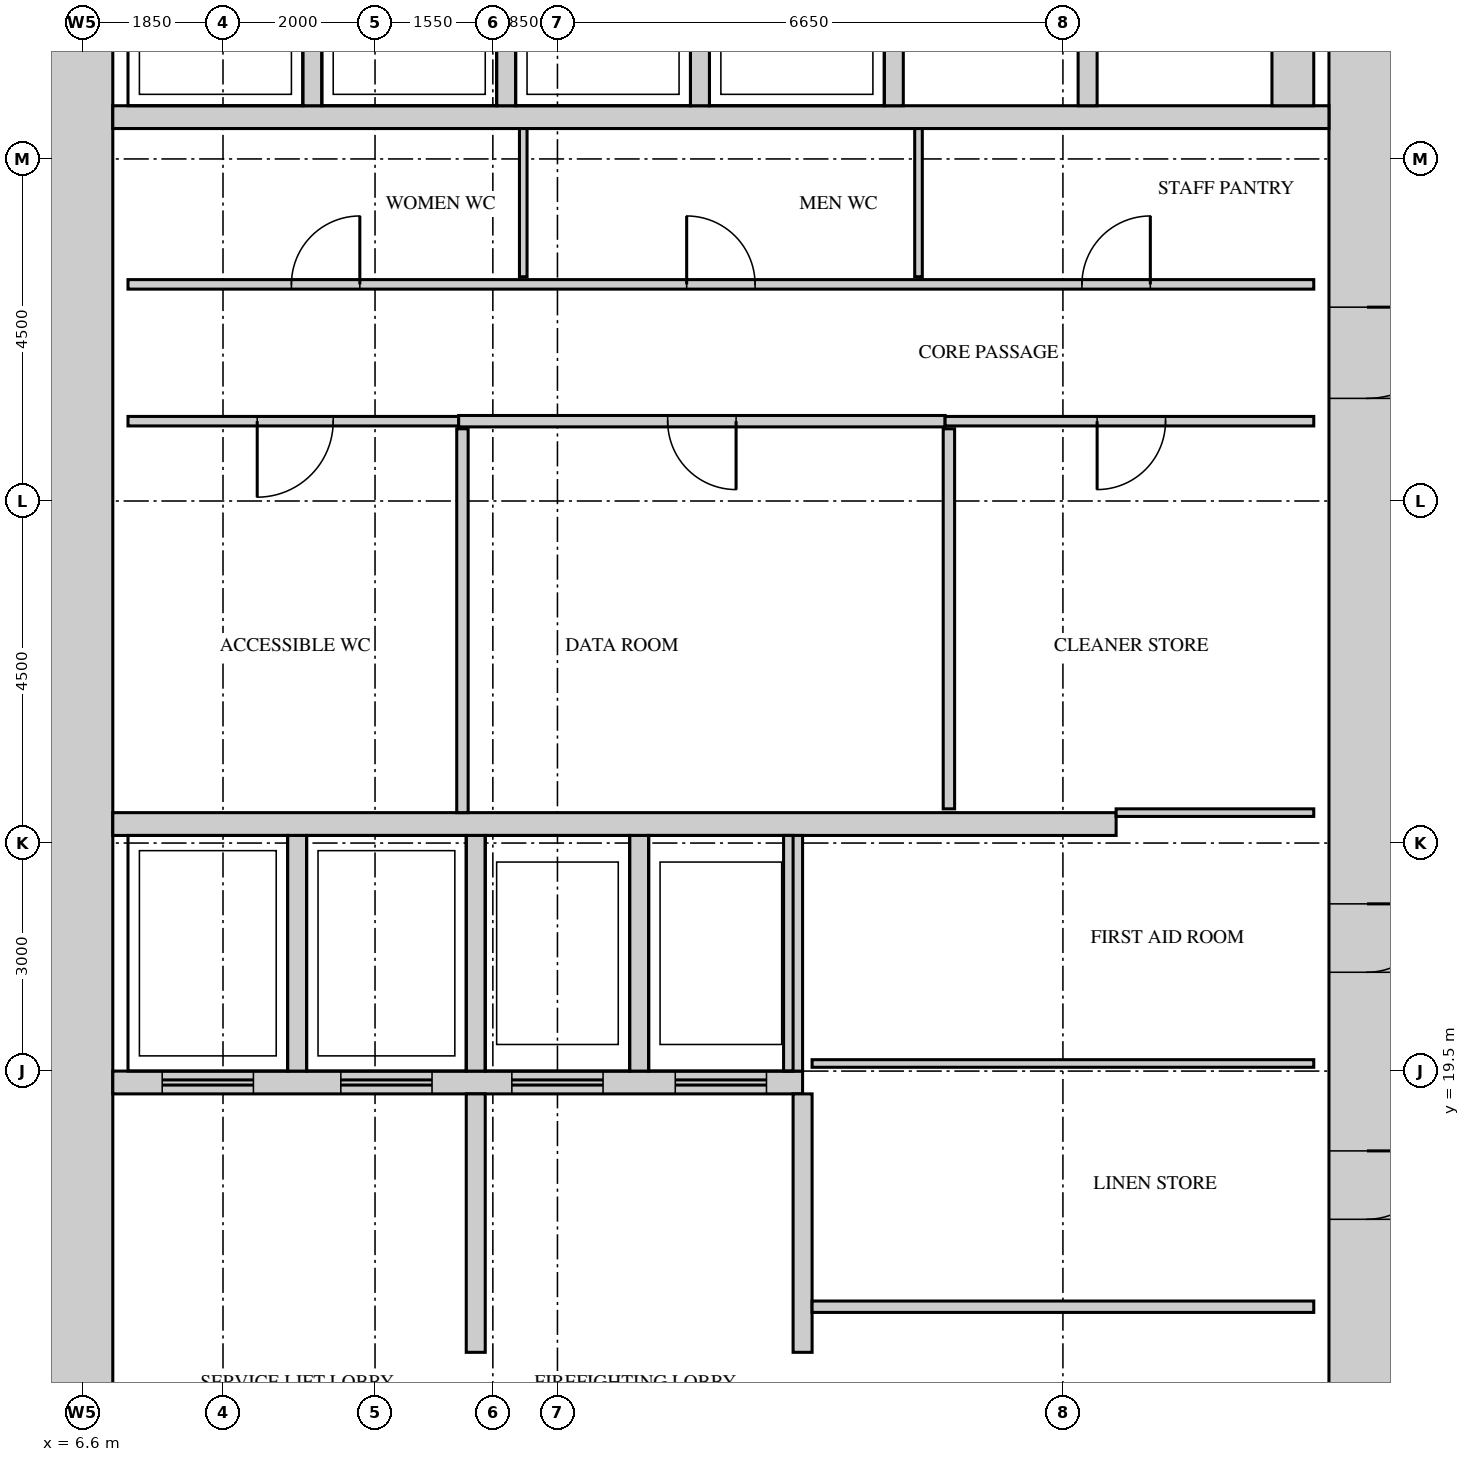
"""IFC4 building model, lengths in metres.
Left out: names, types, materials, properties, quantities, classifications, styles, units other than length and angle.
Written with IfcOpenShell. Run it as: python <this file> out.ifc"""

import sys

from ifc_helpers import new_model, si_unit, direction, frame, frame_2d, origin, place, context, subcontext, project, spatial, rectangle, extrude, source, transform, mapped, element, fill, save


model = new_model("IFC4")
c1 = context("Model", 3, precision=1e-05, world=origin(), true_north=direction((0.0, 1.0)))
c2 = subcontext(c1, "Body", "Model", "MODEL_VIEW")
j1 = project(units=[si_unit("LENGTHUNIT", "METRE"), si_unit("PLANEANGLEUNIT", "RADIAN")], contexts=[c1])
p1 = place(None, origin())
s1 = spatial("IfcSite", under=j1, at=p1, CompositionType="ELEMENT")
p2 = place(p1, origin())
s2 = spatial("IfcBuilding", under=s1, at=p2, CompositionType="ELEMENT")
p3 = place(p2, frame((0.0, 0.0, 136.7)))
s3 = spatial("IfcBuildingStorey", under=s2, at=p3, CompositionType="ELEMENT", Elevation=136.7)
m1 = source(origin(), c2, "Body", "SweptSolid", [
    extrude(rectangle(XDim=28.0, YDim=1.0, at=frame_2d((14.0, 0.0))), origin(), (0.0, 0.0, 1.0), 4.1),
])
p4 = place(p3, frame((23.5, 13.0, 0.0), z_axis=(0.0, 0.0, 1.0), x_axis=(0.0, 1.0, 0.0)))
e1 = element("IfcWall", 1, at=p4, inside=s3, PredefinedType="SHEAR", context=c2, shape_type="MappedRepresentation", body=[
    mapped(m1, transform((0.0, 0.0, 0.0))),
])
m2 = source(origin(), c2, "Body", "SweptSolid", [
    extrude(rectangle(XDim=1.8, YDim=2.1, at=frame_2d((0.9, 1.05))), frame((0.0, 0.51, 0.0), z_axis=(0.0, -1.0, 0.0), x_axis=(1.0, 0.0, 0.0)), (0.0, 0.0, 1.0), 1.02),
])
p5 = place(p4, frame((22.6, 0.0, 0.0)))
e2 = element("IfcOpeningElement", 2, at=p5, cuts=e1, PredefinedType="OPENING", context=c2, shape_type="MappedRepresentation", body=[
    mapped(m2, transform((0.0, 0.0, 0.0))),
])
m3 = source(origin(), c2, "Body", "SweptSolid", [
    extrude(rectangle(XDim=1.2, YDim=2.1, at=frame_2d((0.6, 1.05))), frame((0.0, 0.51, 0.0), z_axis=(0.0, -1.0, 0.0), x_axis=(1.0, 0.0, 0.0)), (0.0, 0.0, 1.0), 1.02),
])
p6 = place(p4, frame((15.35, 0.0, 0.0)))
e3 = element("IfcOpeningElement", 3, at=p6, cuts=e1, PredefinedType="OPENING", context=c2, shape_type="MappedRepresentation", body=[
    mapped(m3, transform((0.0, 0.0, 0.0))),
])
m4 = source(origin(), c2, "Body", "SweptSolid", [
    extrude(rectangle(XDim=0.9, YDim=2.1, at=frame_2d((0.45, 1.05))), frame((0.0, 0.51, 0.0), z_axis=(0.0, -1.0, 0.0), x_axis=(1.0, 0.0, 0.0)), (0.0, 0.0, 1.0), 1.02),
])
p7 = place(p4, frame((1.35, 0.0, 0.0)))
e4 = element("IfcOpeningElement", 4, at=p7, cuts=e1, PredefinedType="OPENING", context=c2, shape_type="MappedRepresentation", body=[
    mapped(m4, transform((0.0, 0.0, 0.0))),
])
p8 = place(p4, frame((4.55, 0.0, 0.0)))
e5 = element("IfcOpeningElement", 5, at=p8, cuts=e1, PredefinedType="OPENING", context=c2, shape_type="MappedRepresentation", body=[
    mapped(m4, transform((0.0, 0.0, 0.0))),
])
p9 = place(p4, frame((7.8, 0.0, 0.0)))
e6 = element("IfcOpeningElement", 6, at=p9, cuts=e1, PredefinedType="OPENING", context=c2, shape_type="MappedRepresentation", body=[
    mapped(m4, transform((0.0, 0.0, 0.0))),
])
p10 = place(p3, frame((6.5, 13.0, 0.0), z_axis=(0.0, 0.0, 1.0), x_axis=(0.0, 1.0, 0.0)))
e7 = element("IfcWall", 7, at=p10, inside=s3, PredefinedType="SHEAR", context=c2, shape_type="MappedRepresentation", body=[
    mapped(m1, transform((0.0, 0.0, 0.0))),
])
m5 = source(origin(), c2, "Body", "SweptSolid", [
    extrude(rectangle(XDim=13.2, YDim=0.3, at=frame_2d((6.6, 0.0))), origin(), (0.0, 0.0, 1.0), 4.1),
])
p11 = place(p3, frame((7.0, 22.75, 0.0), z_axis=(0.0, 0.0, 1.0), x_axis=(1.0, 0.0, 0.0)))
e8 = element("IfcWall", 8, at=p11, inside=s3, PredefinedType="STANDARD", context=c2, shape_type="MappedRepresentation", body=[
    mapped(m5, transform((0.0, 0.0, 0.0))),
])
m6 = source(origin(), c2, "Body", "SweptSolid", [
    extrude(rectangle(XDim=9.075, YDim=0.3, at=frame_2d((4.538, 0.0))), origin(), (0.0, 0.0, 1.0), 4.1),
])
p12 = place(p3, frame((7.0, 19.35, 0.0), z_axis=(0.0, 0.0, 1.0), x_axis=(1.0, 0.0, 0.0)))
e9 = element("IfcWall", 9, at=p12, inside=s3, PredefinedType="STANDARD", context=c2, shape_type="MappedRepresentation", body=[
    mapped(m6, transform((0.0, 0.0, 0.0))),
])
m7 = source(origin(), c2, "Body", "SweptSolid", [
    extrude(rectangle(XDim=1.2, YDim=2.1, at=frame_2d((0.6, 1.05))), frame((0.0, 0.16, 0.0), z_axis=(0.0, -1.0, 0.0), x_axis=(1.0, 0.0, 0.0)), (0.0, 0.0, 1.0), 0.32),
])
p13 = place(p12, frame((0.65, 0.0, 0.0)))
e10 = element("IfcOpeningElement", 10, at=p13, cuts=e9, PredefinedType="OPENING", context=c2, shape_type="MappedRepresentation", body=[
    mapped(m7, transform((0.0, 0.0, 0.0))),
])
p14 = place(p12, frame((3.0, 0.0, 0.0)))
e11 = element("IfcOpeningElement", 11, at=p14, cuts=e9, PredefinedType="OPENING", context=c2, shape_type="MappedRepresentation", body=[
    mapped(m7, transform((0.0, 0.0, 0.0))),
])
p15 = place(p12, frame((5.25, 0.0, 0.0)))
e12 = element("IfcOpeningElement", 12, at=p15, cuts=e9, PredefinedType="OPENING", context=c2, shape_type="MappedRepresentation", body=[
    mapped(m7, transform((0.0, 0.0, 0.0))),
])
p16 = place(p12, frame((7.4, 0.0, 0.0)))
e13 = element("IfcOpeningElement", 13, at=p16, cuts=e9, PredefinedType="OPENING", context=c2, shape_type="MappedRepresentation", body=[
    mapped(m7, transform((0.0, 0.0, 0.0))),
])
m8 = source(origin(), c2, "Body", "SweptSolid", [
    extrude(rectangle(XDim=16.0, YDim=0.3, at=frame_2d((8.0, 0.0))), origin(), (0.0, 0.0, 1.0), 4.1),
])
p17 = place(p3, frame((7.0, 32.05, 0.0), z_axis=(0.0, 0.0, 1.0), x_axis=(1.0, 0.0, 0.0)))
e14 = element("IfcWall", 14, at=p17, inside=s3, PredefinedType="STANDARD", context=c2, shape_type="MappedRepresentation", body=[
    mapped(m8, transform((0.0, 0.0, 0.0))),
])
m9 = source(origin(), c2, "Body", "SweptSolid", [
    extrude(rectangle(XDim=3.1, YDim=0.25, at=frame_2d((1.55, 0.0))), origin(), (0.0, 0.0, 1.0), 4.1),
])
for number, where, z_axis, x_axis in (
    (15, (9.425, 19.5, 0.0), (0.0, 0.0, 1.0), (0.0, 1.0, 0.0)),
    (16, (11.775, 19.5, 0.0), (0.0, 0.0, 1.0), (0.0, 1.0, 0.0)),
    (17, (13.925, 19.5, 0.0), (0.0, 0.0, 1.0), (0.0, 1.0, 0.0)),
    (18, (15.95, 19.5, 0.0), (0.0, 0.0, 1.0), (0.0, 1.0, 0.0)),
):
    element("IfcWall", number, at=place(p3, frame(where, z_axis=z_axis, x_axis=x_axis)), inside=s3, PredefinedType="STANDARD", context=c2, shape_type="MappedRepresentation", body=[
        mapped(m9, transform((0.0, 0.0, 0.0))),
    ])
m10 = source(origin(), c2, "Body", "SweptSolid", [
    extrude(rectangle(XDim=2.4, YDim=0.25, at=frame_2d((1.2, 0.0))), origin(), (0.0, 0.0, 1.0), 4.1),
])
for number, where, z_axis, x_axis in (
    (19, (9.625, 32.2, 0.0), (0.0, 0.0, 1.0), (0.0, 1.0, 0.0)),
    (20, (12.175, 32.2, 0.0), (0.0, 0.0, 1.0), (0.0, 1.0, 0.0)),
    (21, (14.725, 32.2, 0.0), (0.0, 0.0, 1.0), (0.0, 1.0, 0.0)),
    (22, (17.275, 32.2, 0.0), (0.0, 0.0, 1.0), (0.0, 1.0, 0.0)),
    (23, (19.825, 32.2, 0.0), (0.0, 0.0, 1.0), (0.0, 1.0, 0.0)),
):
    element("IfcWall", number, at=place(p3, frame(where, z_axis=z_axis, x_axis=x_axis)), inside=s3, PredefinedType="STANDARD", context=c2, shape_type="MappedRepresentation", body=[
        mapped(m10, transform((0.0, 0.0, 0.0))),
    ])
m11 = source(origin(), c2, "Body", "SweptSolid", [
    extrude(rectangle(XDim=2.4, YDim=0.55, at=frame_2d((1.2, 0.0))), origin(), (0.0, 0.0, 1.0), 4.1),
])
p18 = place(p3, frame((22.525, 32.2, 0.0), z_axis=(0.0, 0.0, 1.0), x_axis=(0.0, 1.0, 0.0)))
e24 = element("IfcWall", 24, at=p18, inside=s3, PredefinedType="STANDARD", context=c2, shape_type="MappedRepresentation", body=[
    mapped(m11, transform((0.0, 0.0, 0.0))),
])
m12 = source(origin(), c2, "Body", "SweptSolid", [
    extrude(rectangle(XDim=3.4, YDim=0.25, at=frame_2d((1.7, 0.0))), origin(), (0.0, 0.0, 1.0), 4.1),
])
for number, where, z_axis, x_axis in (
    (25, (16.075, 15.8, 0.0), (0.0, 0.0, 1.0), (0.0, 1.0, 0.0)),
    (26, (11.775, 15.8, 0.0), (0.0, 0.0, 1.0), (0.0, 1.0, 0.0)),
):
    element("IfcWall", number, at=place(p3, frame(where, z_axis=z_axis, x_axis=x_axis)), inside=s3, PredefinedType="STANDARD", context=c2, shape_type="MappedRepresentation", body=[
        mapped(m12, transform((0.0, 0.0, 0.0))),
    ])
m13 = source(origin(), c2, "Body", "SweptSolid", [
    extrude(rectangle(XDim=6.6, YDim=0.15, at=frame_2d((3.3, 0.0))), origin(), (0.0, 0.0, 1.0), 4.2),
])
p19 = place(p3, frame((16.2, 16.4, 0.0), z_axis=(0.0, 0.0, 1.0), x_axis=(1.0, 0.0, 0.0)))
e27 = element("IfcWall", 27, at=p19, inside=s3, PredefinedType="PARTITIONING", context=c2, shape_type="MappedRepresentation", body=[
    mapped(m13, transform((0.0, 0.0, 0.0))),
])
m14 = source(origin(), c2, "Body", "SweptSolid", [
    extrude(rectangle(XDim=6.6, YDim=0.1, at=frame_2d((3.3, 0.0))), origin(), (0.0, 0.0, 1.0), 4.2),
])
p20 = place(p3, frame((16.2, 19.6, 0.0), z_axis=(0.0, 0.0, 1.0), x_axis=(1.0, 0.0, 0.0)))
e28 = element("IfcWall", 28, at=p20, inside=s3, PredefinedType="PARTITIONING", context=c2, shape_type="MappedRepresentation", body=[
    mapped(m14, transform((0.0, 0.0, 0.0))),
])
m15 = source(origin(), c2, "Body", "SweptSolid", [
    extrude(rectangle(XDim=5.05, YDim=0.15, at=frame_2d((2.525, 0.0))), origin(), (0.0, 0.0, 1.0), 4.2),
])
p21 = place(p3, frame((11.6, 22.9, 0.0), z_axis=(0.0, 0.0, 1.0), x_axis=(0.0, 1.0, 0.0)))
e29 = element("IfcWall", 29, at=p21, inside=s3, PredefinedType="PARTITIONING", context=c2, shape_type="MappedRepresentation", body=[
    mapped(m15, transform((0.0, 0.0, 0.0))),
])
m16 = source(origin(), c2, "Body", "SweptSolid", [
    extrude(rectangle(XDim=2.6, YDim=0.1, at=frame_2d((1.3, 0.0))), origin(), (0.0, 0.0, 1.0), 4.2),
])
p22 = place(p3, frame((20.2, 22.9, 0.0), z_axis=(0.0, 0.0, 1.0), x_axis=(1.0, 0.0, 0.0)))
e30 = element("IfcWall", 30, at=p22, inside=s3, PredefinedType="PARTITIONING", context=c2, shape_type="MappedRepresentation", body=[
    mapped(m16, transform((0.0, 0.0, 0.0))),
])
m17 = source(origin(), c2, "Body", "SweptSolid", [
    extrude(rectangle(XDim=5.0, YDim=0.15, at=frame_2d((2.5, 0.0))), origin(), (0.0, 0.0, 1.0), 4.2),
])
p23 = place(p3, frame((18.0, 22.95, 0.0), z_axis=(0.0, 0.0, 1.0), x_axis=(0.0, 1.0, 0.0)))
e31 = element("IfcWall", 31, at=p23, inside=s3, PredefinedType="PARTITIONING", context=c2, shape_type="MappedRepresentation", body=[
    mapped(m17, transform((0.0, 0.0, 0.0))),
])
m18 = source(origin(), c2, "Body", "SweptSolid", [
    extrude(rectangle(XDim=4.35, YDim=0.125, at=frame_2d((2.175, 0.0))), origin(), (0.0, 0.0, 1.0), 4.2),
])
p24 = place(p3, frame((7.2, 28.05, 0.0), z_axis=(0.0, 0.0, 1.0), x_axis=(1.0, 0.0, 0.0)))
e32 = element("IfcWall", 32, at=p24, inside=s3, PredefinedType="PARTITIONING", context=c2, shape_type="MappedRepresentation", body=[
    mapped(m18, transform((0.0, 0.0, 0.0))),
])
m19 = source(origin(), c2, "Body", "SweptSolid", [
    extrude(rectangle(XDim=1.0, YDim=2.1, at=frame_2d((0.5, 1.05))), frame((0.0, 0.073, 0.0), z_axis=(0.0, -1.0, 0.0), x_axis=(1.0, 0.0, 0.0)), (0.0, 0.0, 1.0), 0.145),
])
p25 = place(p24, frame((1.7, 0.0, 0.0)))
e33 = element("IfcOpeningElement", 33, at=p25, cuts=e32, PredefinedType="OPENING", context=c2, shape_type="MappedRepresentation", body=[
    mapped(m19, transform((0.0, 0.0, 0.0))),
])
m20 = source(origin(), c2, "Body", "SweptSolid", [
    extrude(rectangle(XDim=6.4, YDim=0.15, at=frame_2d((3.2, 0.0))), origin(), (0.0, 0.0, 1.0), 4.2),
])
p26 = place(p3, frame((11.55, 28.05, 0.0), z_axis=(0.0, 0.0, 1.0), x_axis=(1.0, 0.0, 0.0)))
e34 = element("IfcWall", 34, at=p26, inside=s3, PredefinedType="PARTITIONING", context=c2, shape_type="MappedRepresentation", body=[
    mapped(m20, transform((0.0, 0.0, 0.0))),
])
m21 = source(origin(), c2, "Body", "SweptSolid", [
    extrude(rectangle(XDim=0.9, YDim=2.1, at=frame_2d((0.45, 1.05))), frame((0.0, 0.085, 0.0), z_axis=(0.0, -1.0, 0.0), x_axis=(1.0, 0.0, 0.0)), (0.0, 0.0, 1.0), 0.17),
])
p27 = place(p26, frame((2.75, 0.0, 0.0)))
e35 = element("IfcOpeningElement", 35, at=p27, cuts=e34, PredefinedType="OPENING", context=c2, shape_type="MappedRepresentation", body=[
    mapped(m21, transform((0.0, 0.0, 0.0))),
])
m22 = source(origin(), c2, "Body", "SweptSolid", [
    extrude(rectangle(XDim=4.85, YDim=0.125, at=frame_2d((2.425, 0.0))), origin(), (0.0, 0.0, 1.0), 4.2),
])
p28 = place(p3, frame((17.95, 28.05, 0.0), z_axis=(0.0, 0.0, 1.0), x_axis=(1.0, 0.0, 0.0)))
e36 = element("IfcWall", 36, at=p28, inside=s3, PredefinedType="PARTITIONING", context=c2, shape_type="MappedRepresentation", body=[
    mapped(m22, transform((0.0, 0.0, 0.0))),
])
m23 = source(origin(), c2, "Body", "SweptSolid", [
    extrude(rectangle(XDim=0.9, YDim=2.1, at=frame_2d((0.45, 1.05))), frame((0.0, 0.073, 0.0), z_axis=(0.0, -1.0, 0.0), x_axis=(1.0, 0.0, 0.0)), (0.0, 0.0, 1.0), 0.145),
])
p29 = place(p28, frame((2.0, 0.0, 0.0)))
e37 = element("IfcOpeningElement", 37, at=p29, cuts=e36, PredefinedType="OPENING", context=c2, shape_type="MappedRepresentation", body=[
    mapped(m23, transform((0.0, 0.0, 0.0))),
])
m24 = source(origin(), c2, "Body", "SweptSolid", [
    extrude(rectangle(XDim=15.6, YDim=0.125, at=frame_2d((7.8, 0.0))), origin(), (0.0, 0.0, 1.0), 4.2),
])
p30 = place(p3, frame((7.2, 29.85, 0.0), z_axis=(0.0, 0.0, 1.0), x_axis=(1.0, 0.0, 0.0)))
e38 = element("IfcWall", 38, at=p30, inside=s3, PredefinedType="PARTITIONING", context=c2, shape_type="MappedRepresentation", body=[
    mapped(m24, transform((0.0, 0.0, 0.0))),
])
p31 = place(p30, frame((2.15, 0.0, 0.0)))
e39 = element("IfcOpeningElement", 39, at=p31, cuts=e38, PredefinedType="OPENING", context=c2, shape_type="MappedRepresentation", body=[
    mapped(m23, transform((0.0, 0.0, 0.0))),
])
p32 = place(p30, frame((7.35, 0.0, 0.0)))
e40 = element("IfcOpeningElement", 40, at=p32, cuts=e38, PredefinedType="OPENING", context=c2, shape_type="MappedRepresentation", body=[
    mapped(m23, transform((0.0, 0.0, 0.0))),
])
p33 = place(p30, frame((12.55, 0.0, 0.0)))
e41 = element("IfcOpeningElement", 41, at=p33, cuts=e38, PredefinedType="OPENING", context=c2, shape_type="MappedRepresentation", body=[
    mapped(m23, transform((0.0, 0.0, 0.0))),
])
m25 = source(origin(), c2, "Body", "SweptSolid", [
    extrude(rectangle(XDim=1.95, YDim=0.1, at=frame_2d((0.975, 0.0))), origin(), (0.0, 0.0, 1.0), 4.2),
])
for number, where, z_axis, x_axis in (
    (42, (12.4, 29.95, 0.0), (0.0, 0.0, 1.0), (0.0, 1.0, 0.0)),
    (43, (17.6, 29.95, 0.0), (0.0, 0.0, 1.0), (0.0, 1.0, 0.0)),
):
    element("IfcWall", number, at=place(p3, frame(where, z_axis=z_axis, x_axis=x_axis)), inside=s3, PredefinedType="PARTITIONING", context=c2, shape_type="MappedRepresentation", body=[
        mapped(m25, transform((0.0, 0.0, 0.0))),
    ])
m26 = source(origin(), c2, "Body", "SweptSolid", [
    extrude(rectangle(XDim=1.2, YDim=2.1, at=frame_2d((0.6, 1.05))), frame((0.0, 0.45, 0.0), z_axis=(0.0, -1.0, 0.0), x_axis=(1.0, 0.0, 0.0)), (0.0, 0.0, 1.0), 0.9),
])
p34 = place(p6, origin())
e44 = element("IfcDoor", 44, at=p34, inside=s3, OperationType="SINGLE_SWING_RIGHT", PredefinedType="DOOR", context=c2, shape_type="MappedRepresentation", body=[
    mapped(m26, transform((0.0, 0.0, 0.0))),
])
fill(e3, e44)
m27 = source(origin(), c2, "Body", "SweptSolid", [
    extrude(rectangle(XDim=0.9, YDim=2.1, at=frame_2d((0.45, 1.05))), frame((0.0, 0.025, 0.0), z_axis=(0.0, -1.0, 0.0), x_axis=(1.0, 0.0, 0.0)), (0.0, 0.0, 1.0), 0.05),
])
p35 = place(p31, origin())
e45 = element("IfcDoor", 45, at=p35, inside=s3, OperationType="SINGLE_SWING_LEFT", PredefinedType="DOOR", context=c2, shape_type="MappedRepresentation", body=[
    mapped(m27, transform((0.0, 0.0, 0.0))),
])
fill(e39, e45)
p36 = place(p32, origin())
e46 = element("IfcDoor", 46, at=p36, inside=s3, OperationType="SINGLE_SWING_RIGHT", PredefinedType="DOOR", context=c2, shape_type="MappedRepresentation", body=[
    mapped(m27, transform((0.0, 0.0, 0.0))),
])
fill(e40, e46)
p37 = place(p33, origin())
e47 = element("IfcDoor", 47, at=p37, inside=s3, OperationType="SINGLE_SWING_LEFT", PredefinedType="DOOR", context=c2, shape_type="MappedRepresentation", body=[
    mapped(m27, transform((0.0, 0.0, 0.0))),
])
fill(e41, e47)
m28 = source(origin(), c2, "Body", "SweptSolid", [
    extrude(rectangle(XDim=1.0, YDim=2.1, at=frame_2d((0.5, 1.05))), frame((0.0, 0.025, 0.0), z_axis=(0.0, -1.0, 0.0), x_axis=(1.0, 0.0, 0.0)), (0.0, 0.0, 1.0), 0.05),
])
p38 = place(p25, origin())
e48 = element("IfcDoor", 48, at=p38, inside=s3, OperationType="SINGLE_SWING_LEFT", PredefinedType="DOOR", context=c2, shape_type="MappedRepresentation", body=[
    mapped(m28, transform((0.0, 0.0, 0.0))),
])
fill(e33, e48)
p39 = place(p27, origin())
e49 = element("IfcDoor", 49, at=p39, inside=s3, OperationType="SINGLE_SWING_RIGHT", PredefinedType="DOOR", context=c2, shape_type="MappedRepresentation", body=[
    mapped(m27, transform((0.0, 0.0, 0.0))),
])
fill(e35, e49)
p40 = place(p29, origin())
e50 = element("IfcDoor", 50, at=p40, inside=s3, OperationType="SINGLE_SWING_LEFT", PredefinedType="DOOR", context=c2, shape_type="MappedRepresentation", body=[
    mapped(m27, transform((0.0, 0.0, 0.0))),
])
fill(e37, e50)
m29 = source(origin(), c2, "Body", "SweptSolid", [
    extrude(rectangle(XDim=0.9, YDim=2.1, at=frame_2d((0.45, 1.05))), frame((0.0, 0.45, 0.0), z_axis=(0.0, -1.0, 0.0), x_axis=(1.0, 0.0, 0.0)), (0.0, 0.0, 1.0), 0.9),
])
p41 = place(p8, origin())
e51 = element("IfcDoor", 51, at=p41, inside=s3, OperationType="SINGLE_SWING_RIGHT", PredefinedType="DOOR", context=c2, shape_type="MappedRepresentation", body=[
    mapped(m29, transform((0.0, 0.0, 0.0))),
])
fill(e5, e51)
p42 = place(p9, origin())
e52 = element("IfcDoor", 52, at=p42, inside=s3, OperationType="SINGLE_SWING_RIGHT", PredefinedType="DOOR", context=c2, shape_type="MappedRepresentation", body=[
    mapped(m29, transform((0.0, 0.0, 0.0))),
])
fill(e6, e52)
m30 = source(origin(), c2, "Body", "SweptSolid", [
    extrude(rectangle(XDim=1.2, YDim=2.1, at=frame_2d((0.6, 1.05))), frame((0.0, 0.025, 0.0), z_axis=(0.0, -1.0, 0.0), x_axis=(1.0, 0.0, 0.0)), (0.0, 0.0, 1.0), 0.05),
])
p43 = place(p13, origin())
e53 = element("IfcDoor", 53, at=p43, inside=s3, OperationType="DOUBLE_DOOR_SLIDING", PredefinedType="DOOR", context=c2, shape_type="MappedRepresentation", body=[
    mapped(m30, transform((0.0, 0.0, 0.0))),
])
fill(e10, e53)
p44 = place(p14, origin())
e54 = element("IfcDoor", 54, at=p44, inside=s3, OperationType="DOUBLE_DOOR_SLIDING", PredefinedType="DOOR", context=c2, shape_type="MappedRepresentation", body=[
    mapped(m30, transform((0.0, 0.0, 0.0))),
])
fill(e11, e54)
p45 = place(p15, origin())
e55 = element("IfcDoor", 55, at=p45, inside=s3, OperationType="DOUBLE_DOOR_SLIDING", PredefinedType="DOOR", context=c2, shape_type="MappedRepresentation", body=[
    mapped(m30, transform((0.0, 0.0, 0.0))),
])
fill(e12, e55)
p46 = place(p16, origin())
e56 = element("IfcDoor", 56, at=p46, inside=s3, OperationType="DOUBLE_DOOR_SLIDING", PredefinedType="DOOR", context=c2, shape_type="MappedRepresentation", body=[
    mapped(m30, transform((0.0, 0.0, 0.0))),
])
fill(e13, e56)
save(model, sys.argv[1])
